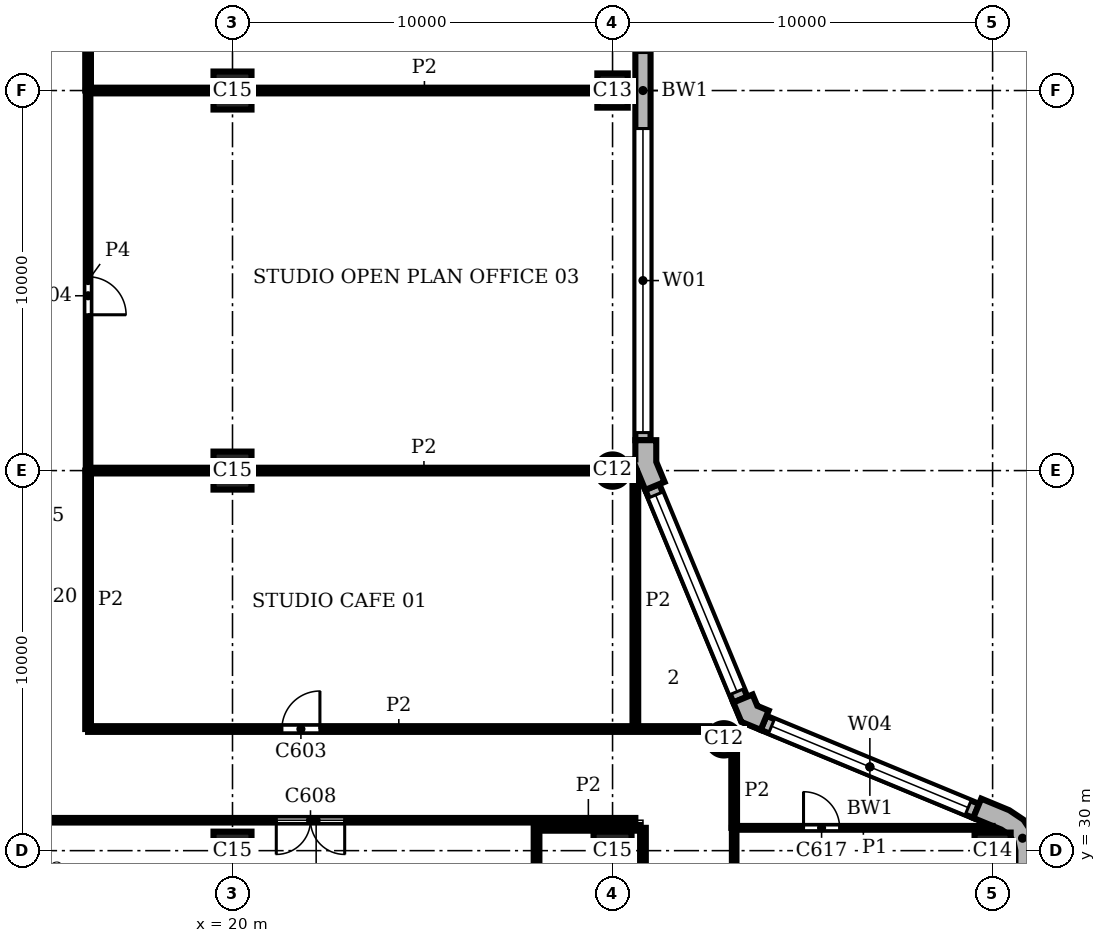
"""IFC4 building model, lengths in metres.
Left out: names, types, materials, properties, quantities, classifications, styles, units other than length and angle.
Written with IfcOpenShell. Run it as: python <this file> out.ifc"""

import sys

from ifc_helpers import new_model, si_unit, direction, frame, frame_2d, origin, origin_2d, place, context, subcontext, project, spatial, polyline, rectangle, circle, outline, extrude, element, fill, save


model = new_model("IFC4")
c1 = context("Model", 3, precision=1e-05, world=origin(), true_north=direction((0.0, 1.0)))
c2 = subcontext(c1, "Body", "Model", "MODEL_VIEW")
j1 = project(units=[si_unit("LENGTHUNIT", "METRE"), si_unit("PLANEANGLEUNIT", "RADIAN")], contexts=[c1])
p1 = place(None, origin())
s1 = spatial("IfcSite", under=j1, at=p1, CompositionType="ELEMENT")
p2 = place(p1, origin())
s2 = spatial("IfcBuilding", under=s1, at=p2, CompositionType="ELEMENT")
p3 = place(p2, frame((0.0, 0.0, 294.3)))
s3 = spatial("IfcBuildingStorey", under=s2, at=p3, CompositionType="ELEMENT", Elevation=294.3)
p4 = place(p3, frame((40.0, 30.0, 0.0), z_axis=(0.0, 0.0, 1.0), x_axis=(1.0, 0.0, 0.0)))
e1 = element("IfcColumn", 1, at=p4, inside=s3, PredefinedType="COLUMN", context=c2, shape_type="SweptSolid", body=[
    extrude(rectangle(XDim=0.95, YDim=0.95, at=origin_2d()), origin(), (0.0, 0.0, 1.0), 3.9),
])
for number, where, z_axis, x_axis in (
    (2, (32.929, 32.929, 0.0), (0.0, 0.0, 1.0), (1.0, 0.0, 0.0)),
    (3, (30.0, 40.0, 0.0), (0.0, 0.0, 1.0), (1.0, 0.0, 0.0)),
):
    element("IfcColumn", number, at=place(p3, frame(where, z_axis=z_axis, x_axis=x_axis)), inside=s3, PredefinedType="COLUMN", context=c2, shape_type="SweptSolid", body=[
        extrude(circle(Radius=0.425, at=origin_2d()), origin(), (0.0, 0.0, 1.0), 3.9),
    ])
p5 = place(p3, frame((30.0, 50.0, 0.0), z_axis=(0.0, 0.0, 1.0), x_axis=(0.0, 1.0, 0.0)))
e4 = element("IfcColumn", 4, at=p5, inside=s3, PredefinedType="COLUMN", context=c2, shape_type="SweptSolid", body=[
    extrude(rectangle(XDim=0.9, YDim=0.8, at=origin_2d()), origin(), (0.0, 0.0, 1.0), 3.9),
])
for number, where, z_axis, x_axis in (
    (5, (20.0, 30.0, 0.0), (0.0, 0.0, 1.0), (1.0, 0.0, 0.0)),
    (6, (20.0, 40.0, 0.0), (0.0, 0.0, 1.0), (1.0, 0.0, 0.0)),
    (7, (20.0, 50.0, 0.0), (0.0, 0.0, 1.0), (1.0, 0.0, 0.0)),
    (8, (30.0, 30.0, 0.0), (0.0, 0.0, 1.0), (1.0, 0.0, 0.0)),
):
    element("IfcColumn", number, at=place(p3, frame(where, z_axis=z_axis, x_axis=x_axis)), inside=s3, PredefinedType="COLUMN", context=c2, shape_type="SweptSolid", body=[
        extrude(rectangle(XDim=1.0, YDim=1.0, at=origin_2d()), origin(), (0.0, 0.0, 1.0), 3.9),
    ])
p6 = place(p3, origin())
e9 = element("IfcWall", 9, at=p6, inside=s3, PredefinedType="SOLIDWALL", context=c2, shape_type="SweptSolid", body=[
    extrude(outline(polyline([(41.0, 29.2), (41.15, 29.2), (41.15, 30.0), (41.062, 30.44), (40.813, 30.813), (40.44, 31.062), (39.701, 31.369), (39.644, 31.23), (39.49, 30.861), (40.229, 30.554), (40.424, 30.424), (40.554, 30.229), (40.6, 30.0), (40.6, 29.2), (41.0, 29.2)])), origin(), (0.0, 0.0, 1.0), 3.9),
])
e10 = element("IfcWall", 10, at=p6, inside=s3, PredefinedType="SOLIDWALL", context=c2, shape_type="SweptSolid", body=[
    extrude(outline(polyline([(34.051, 33.547), (34.108, 33.685), (33.809, 33.809), (33.685, 34.108), (33.547, 34.051), (33.177, 33.898), (33.388, 33.388), (33.898, 33.177), (34.051, 33.547)])), origin(), (0.0, 0.0, 1.0), 3.9),
])
e11 = element("IfcWall", 11, at=p6, inside=s3, PredefinedType="SOLIDWALL", context=c2, shape_type="SweptSolid", body=[
    extrude(outline(polyline([(30.62, 39.995), (30.62, 40.071), (30.861, 39.49), (31.23, 39.644), (31.369, 39.701), (31.15, 40.229), (31.15, 40.8), (31.0, 40.8), (30.6, 40.8), (30.6, 40.295), (30.425, 40.295), (30.425, 39.995), (30.62, 39.995)])), origin(), (0.0, 0.0, 1.0), 3.9),
])
p7 = place(p3, frame((39.567, 31.045, 0.0), z_axis=(0.0, 0.0, 1.0), x_axis=(-0.923891000409, 0.382655745237, 0.0)))
e12 = element("IfcWall", 12, at=p7, inside=s3, PredefinedType="SOLIDWALL", context=c2, shape_type="SweptSolid", body=[
    extrude(rectangle(XDim=6.053, YDim=0.4, at=frame_2d((3.027, 0.0))), origin(), (0.0, 0.0, 1.0), 3.9),
])
p8 = place(p7, frame((0.227, 0.0, 0.9)))
e13 = element("IfcOpeningElement", 13, at=p8, cuts=e12, PredefinedType="OPENING", context=c2, shape_type="SweptSolid", body=[
    extrude(rectangle(XDim=5.6, YDim=2.35, at=frame_2d((2.8, 1.175))), frame((0.0, 0.21, 0.0), z_axis=(0.0, -1.0, 0.0), x_axis=(1.0, 0.0, 0.0)), (0.0, 0.0, 1.0), 0.42),
])
p9 = place(p3, frame((33.362, 33.974, 0.0), z_axis=(0.0, 0.0, 1.0), x_axis=(-0.382655745237, 0.923891000409, 0.0)))
e14 = element("IfcWall", 14, at=p9, inside=s3, PredefinedType="SOLIDWALL", context=c2, shape_type="SweptSolid", body=[
    extrude(rectangle(XDim=6.053, YDim=0.4, at=frame_2d((3.027, 0.0))), origin(), (0.0, 0.0, 1.0), 3.9),
])
p10 = place(p9, frame((0.227, 0.0, 0.9)))
e15 = element("IfcOpeningElement", 15, at=p10, cuts=e14, PredefinedType="OPENING", context=c2, shape_type="SweptSolid", body=[
    extrude(rectangle(XDim=5.6, YDim=2.35, at=frame_2d((2.8, 1.175))), frame((0.0, 0.21, 0.0), z_axis=(0.0, -1.0, 0.0), x_axis=(1.0, 0.0, 0.0)), (0.0, 0.0, 1.0), 0.42),
])
p11 = place(p3, frame((30.8, 40.8, 0.0), z_axis=(0.0, 0.0, 1.0), x_axis=(0.0, 1.0, 0.0)))
e16 = element("IfcWall", 16, at=p11, inside=s3, PredefinedType="SOLIDWALL", context=c2, shape_type="SweptSolid", body=[
    extrude(rectangle(XDim=18.4, YDim=0.4, at=frame_2d((9.2, 0.0))), origin(), (0.0, 0.0, 1.0), 3.9),
])
p12 = place(p11, frame((0.2, 0.0, 0.9)))
e17 = element("IfcOpeningElement", 17, at=p12, cuts=e16, PredefinedType="OPENING", context=c2, shape_type="SweptSolid", body=[
    extrude(rectangle(XDim=8.0, YDim=2.35, at=frame_2d((4.0, 1.175))), frame((0.0, 0.21, 0.0), z_axis=(0.0, -1.0, 0.0), x_axis=(1.0, 0.0, 0.0)), (0.0, 0.0, 1.0), 0.42),
])
p13 = place(p11, frame((10.2, 0.0, 0.9)))
e18 = element("IfcOpeningElement", 18, at=p13, cuts=e16, PredefinedType="OPENING", context=c2, shape_type="SweptSolid", body=[
    extrude(rectangle(XDim=8.0, YDim=2.35, at=frame_2d((4.0, 1.175))), frame((0.0, 0.21, 0.0), z_axis=(0.0, -1.0, 0.0), x_axis=(1.0, 0.0, 0.0)), (0.0, 0.0, 1.0), 0.42),
])
p14 = place(p3, frame((33.2, 30.6, 0.0), z_axis=(0.0, 0.0, 1.0), x_axis=(1.0, 0.0, 0.0)))
e19 = element("IfcWall", 19, at=p14, inside=s3, PredefinedType="PARTITIONING", context=c2, shape_type="SweptSolid", body=[
    extrude(rectangle(XDim=6.799, YDim=0.1, at=frame_2d((3.399, 0.0))), origin(), (0.0, 0.0, 1.0), 3.58),
])
p15 = place(p14, frame((1.825, 0.0, 0.0)))
e20 = element("IfcOpeningElement", 20, at=p15, cuts=e19, PredefinedType="OPENING", context=c2, shape_type="SweptSolid", body=[
    extrude(rectangle(XDim=0.95, YDim=2.1, at=frame_2d((0.475, 1.05))), frame((0.0, 0.06, 0.0), z_axis=(0.0, -1.0, 0.0), x_axis=(1.0, 0.0, 0.0)), (0.0, 0.0, 1.0), 0.12),
])
p16 = place(p3, frame((16.2, 33.2, 0.0), z_axis=(0.0, 0.0, 1.0), x_axis=(0.0, 1.0, 0.0)))
e21 = element("IfcWall", 21, at=p16, inside=s3, PredefinedType="PARTITIONING", context=c2, shape_type="SweptSolid", body=[
    extrude(rectangle(XDim=6.8, YDim=0.15, at=frame_2d((3.4, 0.0))), origin(), (0.0, 0.0, 1.0), 3.58),
])
p17 = place(p3, frame((16.2, 50.0, 0.0), z_axis=(0.0, 0.0, 1.0), x_axis=(0.0, 1.0, 0.0)))
e22 = element("IfcWall", 22, at=p17, inside=s3, PredefinedType="PARTITIONING", context=c2, shape_type="SweptSolid", body=[
    extrude(rectangle(XDim=7.6, YDim=0.15, at=frame_2d((3.8, 0.0))), origin(), (0.0, 0.0, 1.0), 3.58),
])
p18 = place(p3, frame((28.0, 28.0, 0.0), z_axis=(0.0, 0.0, 1.0), x_axis=(0.0, 1.0, 0.0)))
e23 = element("IfcWall", 23, at=p18, inside=s3, PredefinedType="PARTITIONING", context=c2, shape_type="SweptSolid", body=[
    extrude(rectangle(XDim=2.598, YDim=0.15, at=frame_2d((1.299, 0.0))), origin(), (0.0, 0.0, 1.0), 3.58),
])
p19 = place(p3, frame((30.6, 33.2, 0.0), z_axis=(0.0, 0.0, 1.0), x_axis=(0.0, 1.0, 0.0)))
e24 = element("IfcWall", 24, at=p19, inside=s3, PredefinedType="PARTITIONING", context=c2, shape_type="SweptSolid", body=[
    extrude(rectangle(XDim=6.738, YDim=0.15, at=frame_2d((3.369, 0.0))), origin(), (0.0, 0.0, 1.0), 3.58),
])
p20 = place(p3, frame((30.8, 15.45, 0.0), z_axis=(0.0, 0.0, 1.0), x_axis=(0.0, 1.0, 0.0)))
e25 = element("IfcWall", 25, at=p20, inside=s3, PredefinedType="PARTITIONING", context=c2, shape_type="SweptSolid", body=[
    extrude(rectangle(XDim=15.15, YDim=0.15, at=frame_2d((7.575, 0.0))), origin(), (0.0, 0.0, 1.0), 3.58),
])
p21 = place(p20, frame((5.85, 0.0, 0.0)))
e26 = element("IfcOpeningElement", 26, at=p21, cuts=e25, PredefinedType="OPENING", context=c2, shape_type="SweptSolid", body=[
    extrude(rectangle(XDim=1.0, YDim=2.1, at=frame_2d((0.5, 1.05))), frame((0.0, 0.085, 0.0), z_axis=(0.0, -1.0, 0.0), x_axis=(1.0, 0.0, 0.0)), (0.0, 0.0, 1.0), 0.17),
])
p22 = place(p20, frame((11.35, 0.0, 0.0)))
e27 = element("IfcOpeningElement", 27, at=p22, cuts=e25, PredefinedType="OPENING", context=c2, shape_type="SweptSolid", body=[
    extrude(rectangle(XDim=1.0, YDim=2.1, at=frame_2d((0.5, 1.05))), frame((0.0, 0.085, 0.0), z_axis=(0.0, -1.0, 0.0), x_axis=(1.0, 0.0, 0.0)), (0.0, 0.0, 1.0), 0.17),
])
p23 = place(p3, frame((33.2, 30.6, 0.0), z_axis=(0.0, 0.0, 1.0), x_axis=(0.0, 1.0, 0.0)))
e28 = element("IfcWall", 28, at=p23, inside=s3, PredefinedType="PARTITIONING", context=c2, shape_type="SweptSolid", body=[
    extrude(rectangle(XDim=1.952, YDim=0.15, at=frame_2d((0.976, 0.0))), origin(), (0.0, 0.0, 1.0), 3.58),
])
p24 = place(p3, frame((28.002, 30.6, 0.0), z_axis=(0.0, 0.0, 1.0), x_axis=(1.0, 0.0, 0.0)))
e29 = element("IfcWall", 29, at=p24, inside=s3, PredefinedType="PARTITIONING", context=c2, shape_type="SweptSolid", body=[
    extrude(rectangle(XDim=2.723, YDim=0.15, at=frame_2d((1.362, 0.0))), origin(), (0.0, 0.0, 1.0), 3.58),
])
p25 = place(p3, frame((16.2, 33.2, 0.0), z_axis=(0.0, 0.0, 1.0), x_axis=(1.0, 0.0, 0.0)))
e30 = element("IfcWall", 30, at=p25, inside=s3, PredefinedType="PARTITIONING", context=c2, shape_type="SweptSolid", body=[
    extrude(rectangle(XDim=16.352, YDim=0.15, at=frame_2d((8.176, 0.0))), origin(), (0.0, 0.0, 1.0), 3.58),
])
p26 = place(p25, frame((5.1, 0.0, 0.0)))
e31 = element("IfcOpeningElement", 31, at=p26, cuts=e30, PredefinedType="OPENING", context=c2, shape_type="SweptSolid", body=[
    extrude(rectangle(XDim=1.0, YDim=2.1, at=frame_2d((0.5, 1.05))), frame((0.0, 0.085, 0.0), z_axis=(0.0, -1.0, 0.0), x_axis=(1.0, 0.0, 0.0)), (0.0, 0.0, 1.0), 0.17),
])
p27 = place(p3, frame((16.2, 40.0, 0.0), z_axis=(0.0, 0.0, 1.0), x_axis=(1.0, 0.0, 0.0)))
e32 = element("IfcWall", 32, at=p27, inside=s3, PredefinedType="PARTITIONING", context=c2, shape_type="SweptSolid", body=[
    extrude(rectangle(XDim=3.3, YDim=0.15, at=frame_2d((1.65, 0.0))), origin(), (0.0, 0.0, 1.0), 3.58),
])
p28 = place(p3, frame((20.5, 40.0, 0.0), z_axis=(0.0, 0.0, 1.0), x_axis=(1.0, 0.0, 0.0)))
e33 = element("IfcWall", 33, at=p28, inside=s3, PredefinedType="PARTITIONING", context=c2, shape_type="SweptSolid", body=[
    extrude(rectangle(XDim=9.075, YDim=0.15, at=frame_2d((4.538, 0.0))), origin(), (0.0, 0.0, 1.0), 3.58),
])
p29 = place(p3, frame((16.2, 50.0, 0.0), z_axis=(0.0, 0.0, 1.0), x_axis=(1.0, 0.0, 0.0)))
e34 = element("IfcWall", 34, at=p29, inside=s3, PredefinedType="PARTITIONING", context=c2, shape_type="SweptSolid", body=[
    extrude(rectangle(XDim=3.3, YDim=0.15, at=frame_2d((1.65, 0.0))), origin(), (0.0, 0.0, 1.0), 3.58),
])
p30 = place(p3, frame((20.5, 50.0, 0.0), z_axis=(0.0, 0.0, 1.0), x_axis=(1.0, 0.0, 0.0)))
e35 = element("IfcWall", 35, at=p30, inside=s3, PredefinedType="PARTITIONING", context=c2, shape_type="SweptSolid", body=[
    extrude(rectangle(XDim=9.1, YDim=0.15, at=frame_2d((4.55, 0.0))), origin(), (0.0, 0.0, 1.0), 3.58),
])
p31 = place(p3, frame((16.2, 40.0, 0.0), z_axis=(0.0, 0.0, 1.0), x_axis=(0.0, 1.0, 0.0)))
e36 = element("IfcWall", 36, at=p31, inside=s3, PredefinedType="PARTITIONING", context=c2, shape_type="SweptSolid", body=[
    extrude(rectangle(XDim=10.0, YDim=0.12, at=frame_2d((5.0, 0.0))), origin(), (0.0, 0.0, 1.0), 3.58),
])
p32 = place(p31, frame((4.1, 0.0, 0.0)))
e37 = element("IfcOpeningElement", 37, at=p32, cuts=e36, PredefinedType="OPENING", context=c2, shape_type="SweptSolid", body=[
    extrude(rectangle(XDim=1.0, YDim=2.1, at=frame_2d((0.5, 1.05))), frame((0.0, 0.07, 0.0), z_axis=(0.0, -1.0, 0.0), x_axis=(1.0, 0.0, 0.0)), (0.0, 0.0, 1.0), 0.14),
])
p33 = place(p3, frame((33.2, 8.0, 0.0), z_axis=(0.0, 0.0, 1.0), x_axis=(0.0, 1.0, 0.0)))
e38 = element("IfcWall", 38, at=p33, inside=s3, PredefinedType="PARTITIONING", context=c2, shape_type="SweptSolid", body=[
    extrude(rectangle(XDim=22.6, YDim=0.12, at=frame_2d((11.3, 0.0))), origin(), (0.0, 0.0, 1.0), 3.58),
])
p34 = place(p33, frame((7.6, 0.0, 0.0)))
e39 = element("IfcOpeningElement", 39, at=p34, cuts=e38, PredefinedType="OPENING", context=c2, shape_type="SweptSolid", body=[
    extrude(rectangle(XDim=1.8, YDim=2.1, at=frame_2d((0.9, 1.05))), frame((0.0, 0.07, 0.0), z_axis=(0.0, -1.0, 0.0), x_axis=(1.0, 0.0, 0.0)), (0.0, 0.0, 1.0), 0.14),
])
p35 = place(p3, frame((13.802, 30.8, 0.0), z_axis=(0.0, 0.0, 1.0), x_axis=(1.0, 0.0, 0.0)))
e40 = element("IfcWall", 40, at=p35, inside=s3, PredefinedType="PARTITIONING", context=c2, shape_type="SweptSolid", body=[
    extrude(rectangle(XDim=16.798, YDim=0.12, at=frame_2d((8.399, 0.0))), origin(), (0.0, 0.0, 1.0), 3.58),
])
p36 = place(p35, frame((7.35, 0.0, 0.0)))
e41 = element("IfcOpeningElement", 41, at=p36, cuts=e40, PredefinedType="OPENING", context=c2, shape_type="SweptSolid", body=[
    extrude(rectangle(XDim=1.8, YDim=2.1, at=frame_2d((0.9, 1.05))), frame((0.0, 0.07, 0.0), z_axis=(0.0, -1.0, 0.0), x_axis=(1.0, 0.0, 0.0)), (0.0, 0.0, 1.0), 0.14),
])
p37 = place(p8, origin())
e42 = element("IfcWindow", 42, at=p37, inside=s3, PartitioningType="SINGLE_PANEL", PredefinedType="WINDOW", context=c2, shape_type="SweptSolid", body=[
    extrude(rectangle(XDim=5.6, YDim=2.35, at=frame_2d((2.8, 1.175))), frame((0.0, 0.16, 0.0), z_axis=(0.0, -1.0, 0.0), x_axis=(1.0, 0.0, 0.0)), (0.0, 0.0, 1.0), 0.06),
])
fill(e13, e42)
p38 = place(p10, origin())
e43 = element("IfcWindow", 43, at=p38, inside=s3, PartitioningType="SINGLE_PANEL", PredefinedType="WINDOW", context=c2, shape_type="SweptSolid", body=[
    extrude(rectangle(XDim=5.6, YDim=2.35, at=frame_2d((2.8, 1.175))), frame((0.0, 0.16, 0.0), z_axis=(0.0, -1.0, 0.0), x_axis=(1.0, 0.0, 0.0)), (0.0, 0.0, 1.0), 0.06),
])
fill(e15, e43)
p39 = place(p12, origin())
e44 = element("IfcWindow", 44, at=p39, inside=s3, PartitioningType="SINGLE_PANEL", PredefinedType="WINDOW", context=c2, shape_type="SweptSolid", body=[
    extrude(rectangle(XDim=8.0, YDim=2.35, at=frame_2d((4.0, 1.175))), frame((0.0, 0.16, 0.0), z_axis=(0.0, -1.0, 0.0), x_axis=(1.0, 0.0, 0.0)), (0.0, 0.0, 1.0), 0.06),
])
fill(e17, e44)
p40 = place(p26, origin())
e45 = element("IfcDoor", 45, at=p40, inside=s3, OperationType="SINGLE_SWING_RIGHT", PredefinedType="DOOR", context=c2, shape_type="SweptSolid", body=[
    extrude(rectangle(XDim=1.0, YDim=2.1, at=frame_2d((0.5, 1.05))), frame((0.0, 0.025, 0.0), z_axis=(0.0, -1.0, 0.0), x_axis=(1.0, 0.0, 0.0)), (0.0, 0.0, 1.0), 0.05),
])
fill(e31, e45)
p41 = place(p32, frame((1.0, 0.0, 0.0), z_axis=(0.0, 0.0, 1.0), x_axis=(-1.0, 0.0, 0.0)))
e46 = element("IfcDoor", 46, at=p41, inside=s3, OperationType="SINGLE_SWING_RIGHT", PredefinedType="DOOR", context=c2, shape_type="SweptSolid", body=[
    extrude(rectangle(XDim=1.0, YDim=2.1, at=frame_2d((0.5, 1.05))), frame((0.0, 0.025, 0.0), z_axis=(0.0, -1.0, 0.0), x_axis=(1.0, 0.0, 0.0)), (0.0, 0.0, 1.0), 0.05),
])
fill(e37, e46)
p42 = place(p36, frame((1.8, 0.0, 0.0), z_axis=(0.0, 0.0, 1.0), x_axis=(-1.0, 0.0, 0.0)))
e47 = element("IfcDoor", 47, at=p42, inside=s3, OperationType="DOUBLE_DOOR_SINGLE_SWING", PredefinedType="DOOR", context=c2, shape_type="SweptSolid", body=[
    extrude(rectangle(XDim=1.8, YDim=2.1, at=frame_2d((0.9, 1.05))), frame((0.0, 0.025, 0.0), z_axis=(0.0, -1.0, 0.0), x_axis=(1.0, 0.0, 0.0)), (0.0, 0.0, 1.0), 0.05),
])
fill(e41, e47)
p43 = place(p15, origin())
e48 = element("IfcDoor", 48, at=p43, inside=s3, OperationType="SINGLE_SWING_LEFT", PredefinedType="DOOR", context=c2, shape_type="SweptSolid", body=[
    extrude(rectangle(XDim=0.95, YDim=2.1, at=frame_2d((0.475, 1.05))), frame((0.0, 0.025, 0.0), z_axis=(0.0, -1.0, 0.0), x_axis=(1.0, 0.0, 0.0)), (0.0, 0.0, 1.0), 0.05),
])
fill(e20, e48)
save(model, sys.argv[1])
